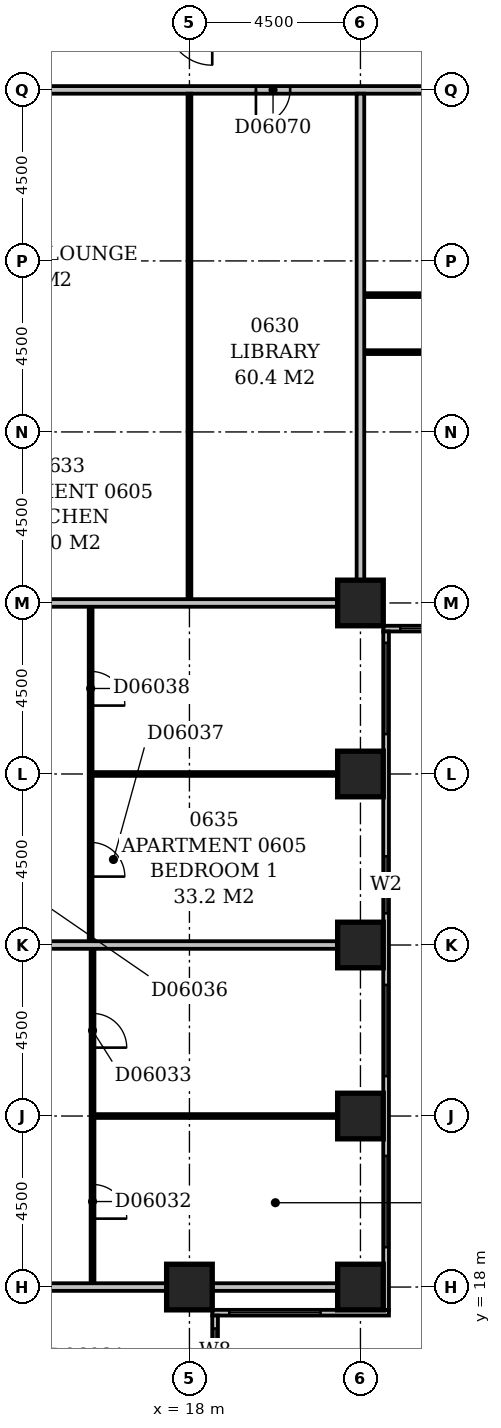
"""IFC4 building model, lengths in metres.
Left out: names, types, materials, properties, quantities, classifications, styles, units other than length and angle.
Written with IfcOpenShell. Run it as: python <this file> out.ifc"""

import sys

from ifc_helpers import new_model, si_unit, direction, frame, frame_2d, origin, origin_2d, place, context, subcontext, project, spatial, rectangle, extrude, element, fill, save


model = new_model("IFC4")
c1 = context("Model", 3, precision=1e-05, world=origin(), true_north=direction((0.0, 1.0)))
c2 = subcontext(c1, "Body", "Model", "MODEL_VIEW")
j1 = project(units=[si_unit("LENGTHUNIT", "METRE"), si_unit("PLANEANGLEUNIT", "RADIAN")], contexts=[c1])
p1 = place(None, origin())
s1 = spatial("IfcSite", under=j1, at=p1, CompositionType="ELEMENT")
p2 = place(p1, origin())
s2 = spatial("IfcBuilding", under=s1, at=p2, CompositionType="ELEMENT")
p3 = place(p2, frame((0.0, 0.0, 32.6)))
s3 = spatial("IfcBuildingStorey", under=s2, at=p3, CompositionType="ELEMENT", Elevation=32.6)
for number, where, z_axis, x_axis in (
    (1, (18.0, 18.0, -0.3), (0.0, 0.0, 1.0), (1.0, 0.0, 0.0)),
    (2, (22.5, 18.0, -0.3), (0.0, 0.0, 1.0), (1.0, 0.0, 0.0)),
    (3, (22.5, 22.5, -0.3), (0.0, 0.0, 1.0), (1.0, 0.0, 0.0)),
    (4, (22.5, 27.0, -0.3), (0.0, 0.0, 1.0), (1.0, 0.0, 0.0)),
    (5, (22.5, 31.5, -0.3), (0.0, 0.0, 1.0), (1.0, 0.0, 0.0)),
    (6, (22.5, 36.0, -0.3), (0.0, 0.0, 1.0), (1.0, 0.0, 0.0)),
):
    element("IfcColumn", number, at=place(p3, frame(where, z_axis=z_axis, x_axis=x_axis)), inside=s3, PredefinedType="COLUMN", context=c2, shape_type="SweptSolid", body=[
        extrude(rectangle(XDim=1.2, YDim=1.2, at=origin_2d()), origin(), (0.0, 0.0, 1.0), 3.6),
    ])
p4 = place(p3, frame((18.675, 8.4, 0.0), z_axis=(0.0, 0.0, 1.0), x_axis=(0.0, 1.0, 0.0)))
e7 = element("IfcWall", 7, at=p4, inside=s3, PredefinedType="STANDARD", context=c2, shape_type="SweptSolid", body=[
    extrude(rectangle(XDim=8.85, YDim=0.15, at=frame_2d((4.425, 0.0))), origin(), (0.0, 0.0, 1.0), 2.7),
])
p5 = place(p4, frame((1.65, 0.0, 0.6)))
e8 = element("IfcOpeningElement", 8, at=p5, cuts=e7, PredefinedType="OPENING", context=c2, shape_type="SweptSolid", body=[
    extrude(rectangle(XDim=2.4, YDim=1.8, at=frame_2d((1.2, 0.9))), frame((0.0, 0.087, 0.0), z_axis=(0.0, -1.0, 0.0), x_axis=(1.0, 0.0, 0.0)), (0.0, 0.0, 1.0), 0.174),
])
p6 = place(p4, frame((7.309, 0.0, 0.6)))
e9 = element("IfcOpeningElement", 9, at=p6, cuts=e7, PredefinedType="OPENING", context=c2, shape_type="SweptSolid", body=[
    extrude(rectangle(XDim=1.2, YDim=1.8, at=frame_2d((0.6, 0.9))), frame((0.0, 0.087, 0.0), z_axis=(0.0, -1.0, 0.0), x_axis=(1.0, 0.0, 0.0)), (0.0, 0.0, 1.0), 0.174),
])
p7 = place(p3, frame((18.6, 17.325, 0.0), z_axis=(0.0, 0.0, 1.0), x_axis=(1.0, 0.0, 0.0)))
e10 = element("IfcWall", 10, at=p7, inside=s3, PredefinedType="STANDARD", context=c2, shape_type="SweptSolid", body=[
    extrude(rectangle(XDim=4.65, YDim=0.15, at=frame_2d((2.325, 0.0))), origin(), (0.0, 0.0, 1.0), 2.7),
])
p8 = place(p7, frame((0.45, 0.0, 0.6)))
e11 = element("IfcOpeningElement", 11, at=p8, cuts=e10, PredefinedType="OPENING", context=c2, shape_type="SweptSolid", body=[
    extrude(rectangle(XDim=2.4, YDim=1.8, at=frame_2d((1.2, 0.9))), frame((0.0, 0.087, 0.0), z_axis=(0.0, -1.0, 0.0), x_axis=(1.0, 0.0, 0.0)), (0.0, 0.0, 1.0), 0.174),
])
p9 = place(p3, frame((23.175, 17.4, 0.0), z_axis=(0.0, 0.0, 1.0), x_axis=(0.0, 1.0, 0.0)))
e12 = element("IfcWall", 12, at=p9, inside=s3, PredefinedType="STANDARD", context=c2, shape_type="SweptSolid", body=[
    extrude(rectangle(XDim=17.85, YDim=0.15, at=frame_2d((8.925, 0.0))), origin(), (0.0, 0.0, 1.0), 2.7),
])
p10 = place(p9, frame((1.65, 0.0, 0.6)))
e13 = element("IfcOpeningElement", 13, at=p10, cuts=e12, PredefinedType="OPENING", context=c2, shape_type="SweptSolid", body=[
    extrude(rectangle(XDim=2.4, YDim=1.8, at=frame_2d((1.2, 0.9))), frame((0.0, 0.087, 0.0), z_axis=(0.0, -1.0, 0.0), x_axis=(1.0, 0.0, 0.0)), (0.0, 0.0, 1.0), 0.174),
])
p11 = place(p9, frame((6.15, 0.0, 0.6)))
e14 = element("IfcOpeningElement", 14, at=p11, cuts=e12, PredefinedType="OPENING", context=c2, shape_type="SweptSolid", body=[
    extrude(rectangle(XDim=2.4, YDim=1.8, at=frame_2d((1.2, 0.9))), frame((0.0, 0.087, 0.0), z_axis=(0.0, -1.0, 0.0), x_axis=(1.0, 0.0, 0.0)), (0.0, 0.0, 1.0), 0.174),
])
p12 = place(p9, frame((10.433, 0.0, 0.6)))
e15 = element("IfcOpeningElement", 15, at=p12, cuts=e12, PredefinedType="OPENING", context=c2, shape_type="SweptSolid", body=[
    extrude(rectangle(XDim=1.5, YDim=1.8, at=frame_2d((0.75, 0.9))), frame((0.0, 0.087, 0.0), z_axis=(0.0, -1.0, 0.0), x_axis=(1.0, 0.0, 0.0)), (0.0, 0.0, 1.0), 0.174),
])
p13 = place(p9, frame((15.15, 0.0, 0.6)))
e16 = element("IfcOpeningElement", 16, at=p13, cuts=e12, PredefinedType="OPENING", context=c2, shape_type="SweptSolid", body=[
    extrude(rectangle(XDim=2.4, YDim=1.8, at=frame_2d((1.2, 0.9))), frame((0.0, 0.087, 0.0), z_axis=(0.0, -1.0, 0.0), x_axis=(1.0, 0.0, 0.0)), (0.0, 0.0, 1.0), 0.174),
])
p14 = place(p3, frame((23.1, 35.325, 0.0), z_axis=(0.0, 0.0, 1.0), x_axis=(1.0, 0.0, 0.0)))
e17 = element("IfcWall", 17, at=p14, inside=s3, PredefinedType="STANDARD", context=c2, shape_type="SweptSolid", body=[
    extrude(rectangle(XDim=45.15, YDim=0.15, at=frame_2d((22.575, 0.0))), origin(), (0.0, 0.0, 1.0), 2.7),
])
p15 = place(p14, frame((0.45, 0.0, 0.6)))
e18 = element("IfcOpeningElement", 18, at=p15, cuts=e17, PredefinedType="OPENING", context=c2, shape_type="SweptSolid", body=[
    extrude(rectangle(XDim=2.4, YDim=1.8, at=frame_2d((1.2, 0.9))), frame((0.0, 0.087, 0.0), z_axis=(0.0, -1.0, 0.0), x_axis=(1.0, 0.0, 0.0)), (0.0, 0.0, 1.0), 0.174),
])
p16 = place(p14, frame((4.95, 0.0, 0.6)))
e19 = element("IfcOpeningElement", 19, at=p16, cuts=e17, PredefinedType="OPENING", context=c2, shape_type="SweptSolid", body=[
    extrude(rectangle(XDim=2.4, YDim=1.8, at=frame_2d((1.2, 0.9))), frame((0.0, 0.087, 0.0), z_axis=(0.0, -1.0, 0.0), x_axis=(1.0, 0.0, 0.0)), (0.0, 0.0, 1.0), 0.174),
])
p17 = place(p14, frame((10.583, 0.0, 0.6)))
e20 = element("IfcOpeningElement", 20, at=p17, cuts=e17, PredefinedType="OPENING", context=c2, shape_type="SweptSolid", body=[
    extrude(rectangle(XDim=1.5, YDim=1.8, at=frame_2d((0.75, 0.9))), frame((0.0, 0.087, 0.0), z_axis=(0.0, -1.0, 0.0), x_axis=(1.0, 0.0, 0.0)), (0.0, 0.0, 1.0), 0.174),
])
p18 = place(p14, frame((13.83, 0.0, 0.6)))
e21 = element("IfcOpeningElement", 21, at=p18, cuts=e17, PredefinedType="OPENING", context=c2, shape_type="SweptSolid", body=[
    extrude(rectangle(XDim=1.5, YDim=1.8, at=frame_2d((0.75, 0.9))), frame((0.0, 0.087, 0.0), z_axis=(0.0, -1.0, 0.0), x_axis=(1.0, 0.0, 0.0)), (0.0, 0.0, 1.0), 0.174),
])
p19 = place(p14, frame((18.45, 0.0, 0.6)))
e22 = element("IfcOpeningElement", 22, at=p19, cuts=e17, PredefinedType="OPENING", context=c2, shape_type="SweptSolid", body=[
    extrude(rectangle(XDim=2.4, YDim=1.8, at=frame_2d((1.2, 0.9))), frame((0.0, 0.087, 0.0), z_axis=(0.0, -1.0, 0.0), x_axis=(1.0, 0.0, 0.0)), (0.0, 0.0, 1.0), 0.174),
])
p20 = place(p14, frame((22.95, 0.0, 0.6)))
e23 = element("IfcOpeningElement", 23, at=p20, cuts=e17, PredefinedType="OPENING", context=c2, shape_type="SweptSolid", body=[
    extrude(rectangle(XDim=2.4, YDim=1.8, at=frame_2d((1.2, 0.9))), frame((0.0, 0.087, 0.0), z_axis=(0.0, -1.0, 0.0), x_axis=(1.0, 0.0, 0.0)), (0.0, 0.0, 1.0), 0.174),
])
p21 = place(p14, frame((27.45, 0.0, 0.6)))
e24 = element("IfcOpeningElement", 24, at=p21, cuts=e17, PredefinedType="OPENING", context=c2, shape_type="SweptSolid", body=[
    extrude(rectangle(XDim=2.4, YDim=1.8, at=frame_2d((1.2, 0.9))), frame((0.0, 0.087, 0.0), z_axis=(0.0, -1.0, 0.0), x_axis=(1.0, 0.0, 0.0)), (0.0, 0.0, 1.0), 0.174),
])
p22 = place(p14, frame((31.95, 0.0, 0.6)))
e25 = element("IfcOpeningElement", 25, at=p22, cuts=e17, PredefinedType="OPENING", context=c2, shape_type="SweptSolid", body=[
    extrude(rectangle(XDim=2.4, YDim=1.8, at=frame_2d((1.2, 0.9))), frame((0.0, 0.087, 0.0), z_axis=(0.0, -1.0, 0.0), x_axis=(1.0, 0.0, 0.0)), (0.0, 0.0, 1.0), 0.174),
])
p23 = place(p14, frame((36.297, 0.0, 0.6)))
e26 = element("IfcOpeningElement", 26, at=p23, cuts=e17, PredefinedType="OPENING", context=c2, shape_type="SweptSolid", body=[
    extrude(rectangle(XDim=2.1, YDim=1.8, at=frame_2d((1.05, 0.9))), frame((0.0, 0.087, 0.0), z_axis=(0.0, -1.0, 0.0), x_axis=(1.0, 0.0, 0.0)), (0.0, 0.0, 1.0), 0.174),
])
p24 = place(p14, frame((40.95, 0.0, 0.6)))
e27 = element("IfcOpeningElement", 27, at=p24, cuts=e17, PredefinedType="OPENING", context=c2, shape_type="SweptSolid", body=[
    extrude(rectangle(XDim=2.4, YDim=1.8, at=frame_2d((1.2, 0.9))), frame((0.0, 0.087, 0.0), z_axis=(0.0, -1.0, 0.0), x_axis=(1.0, 0.0, 0.0)), (0.0, 0.0, 1.0), 0.174),
])
p25 = place(p3, frame((9.1, 18.0, 0.0), z_axis=(0.0, 0.0, 1.0), x_axis=(1.0, 0.0, 0.0)))
e28 = element("IfcWall", 28, at=p25, inside=s3, PredefinedType="PARTITIONING", context=c2, shape_type="SweptSolid", body=[
    extrude(rectangle(XDim=8.3, YDim=0.2, at=frame_2d((4.15, 0.0))), origin(), (0.0, 0.0, 1.0), 2.6),
])
p26 = place(p3, frame((18.6, 18.0, 0.0), z_axis=(0.0, 0.0, 1.0), x_axis=(1.0, 0.0, 0.0)))
e29 = element("IfcWall", 29, at=p26, inside=s3, PredefinedType="PARTITIONING", context=c2, shape_type="SweptSolid", body=[
    extrude(rectangle(XDim=3.3, YDim=0.2, at=frame_2d((1.65, 0.0))), origin(), (0.0, 0.0, 1.0), 2.7),
])
p27 = place(p3, frame((15.45, 18.1, 0.0), z_axis=(0.0, 0.0, 1.0), x_axis=(0.0, 1.0, 0.0)))
e30 = element("IfcWall", 30, at=p27, inside=s3, PredefinedType="PARTITIONING", context=c2, shape_type="SweptSolid", body=[
    extrude(rectangle(XDim=8.8, YDim=0.1, at=frame_2d((4.4, 0.0))), origin(), (0.0, 0.0, 1.0), 3.3),
])
p28 = place(p27, frame((1.7, 0.0, 0.0)))
e31 = element("IfcOpeningElement", 31, at=p28, cuts=e30, PredefinedType="OPENING", context=c2, shape_type="SweptSolid", body=[
    extrude(rectangle(XDim=0.9, YDim=2.1, at=frame_2d((0.45, 1.05))), frame((0.0, 0.062, 0.0), z_axis=(0.0, -1.0, 0.0), x_axis=(1.0, 0.0, 0.0)), (0.0, 0.0, 1.0), 0.124),
])
p29 = place(p27, frame((6.2, 0.0, 0.0)))
e32 = element("IfcOpeningElement", 32, at=p29, cuts=e30, PredefinedType="OPENING", context=c2, shape_type="SweptSolid", body=[
    extrude(rectangle(XDim=0.9, YDim=2.1, at=frame_2d((0.45, 1.05))), frame((0.0, 0.062, 0.0), z_axis=(0.0, -1.0, 0.0), x_axis=(1.0, 0.0, 0.0)), (0.0, 0.0, 1.0), 0.124),
])
p30 = place(p3, frame((15.5, 22.5, 0.0), z_axis=(0.0, 0.0, 1.0), x_axis=(1.0, 0.0, 0.0)))
e33 = element("IfcWall", 33, at=p30, inside=s3, PredefinedType="PARTITIONING", context=c2, shape_type="SweptSolid", body=[
    extrude(rectangle(XDim=6.4, YDim=0.1, at=frame_2d((3.2, 0.0))), origin(), (0.0, 0.0, 1.0), 3.3),
])
p31 = place(p3, frame((9.1, 27.0, 0.0), z_axis=(0.0, 0.0, 1.0), x_axis=(1.0, 0.0, 0.0)))
e34 = element("IfcWall", 34, at=p31, inside=s3, PredefinedType="PARTITIONING", context=c2, shape_type="SweptSolid", body=[
    extrude(rectangle(XDim=12.8, YDim=0.2, at=frame_2d((6.4, 0.0))), origin(), (0.0, 0.0, 1.0), 2.7),
])
p32 = place(p3, frame((15.4, 27.1, 0.0), z_axis=(0.0, 0.0, 1.0), x_axis=(0.0, 1.0, 0.0)))
e35 = element("IfcWall", 35, at=p32, inside=s3, PredefinedType="PARTITIONING", context=c2, shape_type="SweptSolid", body=[
    extrude(rectangle(XDim=8.8, YDim=0.1, at=frame_2d((4.4, 0.0))), origin(), (0.0, 0.0, 1.0), 3.3),
])
p33 = place(p32, frame((1.7, 0.0, 0.0)))
e36 = element("IfcOpeningElement", 36, at=p33, cuts=e35, PredefinedType="OPENING", context=c2, shape_type="SweptSolid", body=[
    extrude(rectangle(XDim=0.9, YDim=2.1, at=frame_2d((0.45, 1.05))), frame((0.0, 0.062, 0.0), z_axis=(0.0, -1.0, 0.0), x_axis=(1.0, 0.0, 0.0)), (0.0, 0.0, 1.0), 0.124),
])
p34 = place(p32, frame((6.2, 0.0, 0.0)))
e37 = element("IfcOpeningElement", 37, at=p34, cuts=e35, PredefinedType="OPENING", context=c2, shape_type="SweptSolid", body=[
    extrude(rectangle(XDim=0.9, YDim=2.1, at=frame_2d((0.45, 1.05))), frame((0.0, 0.062, 0.0), z_axis=(0.0, -1.0, 0.0), x_axis=(1.0, 0.0, 0.0)), (0.0, 0.0, 1.0), 0.124),
])
p35 = place(p3, frame((15.45, 31.5, 0.0), z_axis=(0.0, 0.0, 1.0), x_axis=(1.0, 0.0, 0.0)))
e38 = element("IfcWall", 38, at=p35, inside=s3, PredefinedType="PARTITIONING", context=c2, shape_type="SweptSolid", body=[
    extrude(rectangle(XDim=6.45, YDim=0.1, at=frame_2d((3.225, 0.0))), origin(), (0.0, 0.0, 1.0), 3.3),
])
p36 = place(p3, frame((9.1, 36.0, 0.0), z_axis=(0.0, 0.0, 1.0), x_axis=(1.0, 0.0, 0.0)))
e39 = element("IfcWall", 39, at=p36, inside=s3, PredefinedType="PARTITIONING", context=c2, shape_type="SweptSolid", body=[
    extrude(rectangle(XDim=12.8, YDim=0.2, at=frame_2d((6.4, 0.0))), origin(), (0.0, 0.0, 1.0), 2.4),
])
p37 = place(p3, frame((18.0, 36.1, 0.0), z_axis=(0.0, 0.0, 1.0), x_axis=(0.0, 1.0, 0.0)))
e40 = element("IfcWall", 40, at=p37, inside=s3, PredefinedType="PARTITIONING", context=c2, shape_type="SweptSolid", body=[
    extrude(rectangle(XDim=13.3, YDim=0.1, at=frame_2d((6.65, 0.0))), origin(), (0.0, 0.0, 1.0), 3.3),
])
p38 = place(p3, frame((22.5, 36.6, 0.0), z_axis=(0.0, 0.0, 1.0), x_axis=(0.0, 1.0, 0.0)))
e41 = element("IfcWall", 41, at=p38, inside=s3, PredefinedType="PARTITIONING", context=c2, shape_type="SweptSolid", body=[
    extrude(rectangle(XDim=12.8, YDim=0.2, at=frame_2d((6.4, 0.0))), origin(), (0.0, 0.0, 1.0), 3.3),
])
p39 = place(p3, frame((22.6, 42.6, 0.0), z_axis=(0.0, 0.0, 1.0), x_axis=(1.0, 0.0, 0.0)))
e42 = element("IfcWall", 42, at=p39, inside=s3, PredefinedType="PARTITIONING", context=c2, shape_type="SweptSolid", body=[
    extrude(rectangle(XDim=17.8, YDim=0.1, at=frame_2d((8.9, 0.0))), origin(), (0.0, 0.0, 1.0), 3.3),
])
p40 = place(p39, frame((3.9, 0.0, 0.0)))
e43 = element("IfcOpeningElement", 43, at=p40, cuts=e42, PredefinedType="OPENING", context=c2, shape_type="SweptSolid", body=[
    extrude(rectangle(XDim=0.9, YDim=2.1, at=frame_2d((0.45, 1.05))), frame((0.0, 0.062, 0.0), z_axis=(0.0, -1.0, 0.0), x_axis=(1.0, 0.0, 0.0)), (0.0, 0.0, 1.0), 0.124),
])
p41 = place(p39, frame((10.7, 0.0, 0.0)))
e44 = element("IfcOpeningElement", 44, at=p41, cuts=e42, PredefinedType="OPENING", context=c2, shape_type="SweptSolid", body=[
    extrude(rectangle(XDim=0.9, YDim=2.1, at=frame_2d((0.45, 1.05))), frame((0.0, 0.062, 0.0), z_axis=(0.0, -1.0, 0.0), x_axis=(1.0, 0.0, 0.0)), (0.0, 0.0, 1.0), 0.124),
])
p42 = place(p39, frame((14.05, 0.0, 0.0)))
e45 = element("IfcOpeningElement", 45, at=p42, cuts=e42, PredefinedType="OPENING", context=c2, shape_type="SweptSolid", body=[
    extrude(rectangle(XDim=0.9, YDim=2.1, at=frame_2d((0.45, 1.05))), frame((0.0, 0.062, 0.0), z_axis=(0.0, -1.0, 0.0), x_axis=(1.0, 0.0, 0.0)), (0.0, 0.0, 1.0), 0.124),
])
p43 = place(p3, frame((22.6, 44.1, 0.0), z_axis=(0.0, 0.0, 1.0), x_axis=(1.0, 0.0, 0.0)))
e46 = element("IfcWall", 46, at=p43, inside=s3, PredefinedType="PARTITIONING", context=c2, shape_type="SweptSolid", body=[
    extrude(rectangle(XDim=6.75, YDim=0.1, at=frame_2d((3.375, 0.0))), origin(), (0.0, 0.0, 1.0), 3.3),
])
p44 = place(p43, frame((2.9, 0.0, 0.0)))
e47 = element("IfcOpeningElement", 47, at=p44, cuts=e46, PredefinedType="OPENING", context=c2, shape_type="SweptSolid", body=[
    extrude(rectangle(XDim=0.9, YDim=2.1, at=frame_2d((0.45, 1.05))), frame((0.0, 0.062, 0.0), z_axis=(0.0, -1.0, 0.0), x_axis=(1.0, 0.0, 0.0)), (0.0, 0.0, 1.0), 0.124),
])
p45 = place(p3, frame((9.1, 49.5, 0.0), z_axis=(0.0, 0.0, 1.0), x_axis=(1.0, 0.0, 0.0)))
e48 = element("IfcWall", 48, at=p45, inside=s3, PredefinedType="PARTITIONING", context=c2, shape_type="SweptSolid", body=[
    extrude(rectangle(XDim=57.8, YDim=0.2, at=frame_2d((28.9, 0.0))), origin(), (0.0, 0.0, 1.0), 3.3),
])
p46 = place(p45, frame((20.6, 0.0, 0.0)))
e49 = element("IfcOpeningElement", 49, at=p46, cuts=e48, PredefinedType="OPENING", context=c2, shape_type="SweptSolid", body=[
    extrude(rectangle(XDim=1.0, YDim=2.1, at=frame_2d((0.5, 1.05))), frame((0.0, 0.112, 0.0), z_axis=(0.0, -1.0, 0.0), x_axis=(1.0, 0.0, 0.0)), (0.0, 0.0, 1.0), 0.224),
])
p47 = place(p45, frame((31.7, 0.0, 0.0)))
e50 = element("IfcOpeningElement", 50, at=p47, cuts=e48, PredefinedType="OPENING", context=c2, shape_type="SweptSolid", body=[
    extrude(rectangle(XDim=1.0, YDim=2.1, at=frame_2d((0.5, 1.05))), frame((0.0, 0.112, 0.0), z_axis=(0.0, -1.0, 0.0), x_axis=(1.0, 0.0, 0.0)), (0.0, 0.0, 1.0), 0.224),
])
p48 = place(p45, frame((47.6, 0.0, 0.0)))
e51 = element("IfcOpeningElement", 51, at=p48, cuts=e48, PredefinedType="OPENING", context=c2, shape_type="SweptSolid", body=[
    extrude(rectangle(XDim=1.0, YDim=2.1, at=frame_2d((0.5, 1.05))), frame((0.0, 0.112, 0.0), z_axis=(0.0, -1.0, 0.0), x_axis=(1.0, 0.0, 0.0)), (0.0, 0.0, 1.0), 0.224),
])
p49 = place(p45, frame((54.15, 0.0, 0.0)))
e52 = element("IfcOpeningElement", 52, at=p49, cuts=e48, PredefinedType="OPENING", context=c2, shape_type="SweptSolid", body=[
    extrude(rectangle(XDim=1.0, YDim=2.1, at=frame_2d((0.5, 1.05))), frame((0.0, 0.112, 0.0), z_axis=(0.0, -1.0, 0.0), x_axis=(1.0, 0.0, 0.0)), (0.0, 0.0, 1.0), 0.224),
])
p50 = place(p45, frame((10.65, 0.0, 0.0)))
e53 = element("IfcOpeningElement", 53, at=p50, cuts=e48, PredefinedType="OPENING", context=c2, shape_type="SweptSolid", body=[
    extrude(rectangle(XDim=0.9, YDim=2.1, at=frame_2d((0.45, 1.05))), frame((0.0, 0.112, 0.0), z_axis=(0.0, -1.0, 0.0), x_axis=(1.0, 0.0, 0.0)), (0.0, 0.0, 1.0), 0.224),
])
p51 = place(p6, origin())
e54 = element("IfcWindow", 54, at=p51, inside=s3, PartitioningType="SINGLE_PANEL", PredefinedType="WINDOW", context=c2, shape_type="SweptSolid", body=[
    extrude(rectangle(XDim=1.2, YDim=1.8, at=frame_2d((0.6, 0.9))), frame((0.0, 0.03, 0.0), z_axis=(0.0, -1.0, 0.0), x_axis=(1.0, 0.0, 0.0)), (0.0, 0.0, 1.0), 0.06),
])
fill(e9, e54)
p52 = place(p8, origin())
e55 = element("IfcWindow", 55, at=p52, inside=s3, PartitioningType="SINGLE_PANEL", PredefinedType="WINDOW", context=c2, shape_type="SweptSolid", body=[
    extrude(rectangle(XDim=2.4, YDim=1.8, at=frame_2d((1.2, 0.9))), frame((0.0, 0.03, 0.0), z_axis=(0.0, -1.0, 0.0), x_axis=(1.0, 0.0, 0.0)), (0.0, 0.0, 1.0), 0.06),
])
fill(e11, e55)
p53 = place(p10, origin())
e56 = element("IfcWindow", 56, at=p53, inside=s3, PartitioningType="SINGLE_PANEL", PredefinedType="WINDOW", context=c2, shape_type="SweptSolid", body=[
    extrude(rectangle(XDim=2.4, YDim=1.8, at=frame_2d((1.2, 0.9))), frame((0.0, 0.03, 0.0), z_axis=(0.0, -1.0, 0.0), x_axis=(1.0, 0.0, 0.0)), (0.0, 0.0, 1.0), 0.06),
])
fill(e13, e56)
p54 = place(p11, origin())
e57 = element("IfcWindow", 57, at=p54, inside=s3, PartitioningType="SINGLE_PANEL", PredefinedType="WINDOW", context=c2, shape_type="SweptSolid", body=[
    extrude(rectangle(XDim=2.4, YDim=1.8, at=frame_2d((1.2, 0.9))), frame((0.0, 0.03, 0.0), z_axis=(0.0, -1.0, 0.0), x_axis=(1.0, 0.0, 0.0)), (0.0, 0.0, 1.0), 0.06),
])
fill(e14, e57)
p55 = place(p12, origin())
e58 = element("IfcWindow", 58, at=p55, inside=s3, PartitioningType="SINGLE_PANEL", PredefinedType="WINDOW", context=c2, shape_type="SweptSolid", body=[
    extrude(rectangle(XDim=1.5, YDim=1.8, at=frame_2d((0.75, 0.9))), frame((0.0, 0.03, 0.0), z_axis=(0.0, -1.0, 0.0), x_axis=(1.0, 0.0, 0.0)), (0.0, 0.0, 1.0), 0.06),
])
fill(e15, e58)
p56 = place(p13, origin())
e59 = element("IfcWindow", 59, at=p56, inside=s3, PartitioningType="SINGLE_PANEL", PredefinedType="WINDOW", context=c2, shape_type="SweptSolid", body=[
    extrude(rectangle(XDim=2.4, YDim=1.8, at=frame_2d((1.2, 0.9))), frame((0.0, 0.03, 0.0), z_axis=(0.0, -1.0, 0.0), x_axis=(1.0, 0.0, 0.0)), (0.0, 0.0, 1.0), 0.06),
])
fill(e16, e59)
p57 = place(p15, origin())
e60 = element("IfcWindow", 60, at=p57, inside=s3, PartitioningType="SINGLE_PANEL", PredefinedType="WINDOW", context=c2, shape_type="SweptSolid", body=[
    extrude(rectangle(XDim=2.4, YDim=1.8, at=frame_2d((1.2, 0.9))), frame((0.0, 0.03, 0.0), z_axis=(0.0, -1.0, 0.0), x_axis=(1.0, 0.0, 0.0)), (0.0, 0.0, 1.0), 0.06),
])
fill(e18, e60)
p58 = place(p28, frame((0.9, 0.0, 0.0), z_axis=(0.0, 0.0, 1.0), x_axis=(-1.0, 0.0, 0.0)))
e61 = element("IfcDoor", 61, at=p58, inside=s3, OperationType="SINGLE_SWING_RIGHT", PredefinedType="DOOR", context=c2, shape_type="SweptSolid", body=[
    extrude(rectangle(XDim=0.9, YDim=2.1, at=frame_2d((0.45, 1.05))), frame((0.0, 0.025, 0.0), z_axis=(0.0, -1.0, 0.0), x_axis=(1.0, 0.0, 0.0)), (0.0, 0.0, 1.0), 0.05),
])
fill(e31, e61)
p59 = place(p29, frame((0.9, 0.0, 0.0), z_axis=(0.0, 0.0, 1.0), x_axis=(-1.0, 0.0, 0.0)))
e62 = element("IfcDoor", 62, at=p59, inside=s3, OperationType="SINGLE_SWING_RIGHT", PredefinedType="DOOR", context=c2, shape_type="SweptSolid", body=[
    extrude(rectangle(XDim=0.9, YDim=2.1, at=frame_2d((0.45, 1.05))), frame((0.0, 0.025, 0.0), z_axis=(0.0, -1.0, 0.0), x_axis=(1.0, 0.0, 0.0)), (0.0, 0.0, 1.0), 0.05),
])
fill(e32, e62)
p60 = place(p33, frame((0.9, 0.0, 0.0), z_axis=(0.0, 0.0, 1.0), x_axis=(-1.0, 0.0, 0.0)))
e63 = element("IfcDoor", 63, at=p60, inside=s3, OperationType="SINGLE_SWING_RIGHT", PredefinedType="DOOR", context=c2, shape_type="SweptSolid", body=[
    extrude(rectangle(XDim=0.9, YDim=2.1, at=frame_2d((0.45, 1.05))), frame((0.0, 0.025, 0.0), z_axis=(0.0, -1.0, 0.0), x_axis=(1.0, 0.0, 0.0)), (0.0, 0.0, 1.0), 0.05),
])
fill(e36, e63)
p61 = place(p34, frame((0.9, 0.0, 0.0), z_axis=(0.0, 0.0, 1.0), x_axis=(-1.0, 0.0, 0.0)))
e64 = element("IfcDoor", 64, at=p61, inside=s3, OperationType="SINGLE_SWING_RIGHT", PredefinedType="DOOR", context=c2, shape_type="SweptSolid", body=[
    extrude(rectangle(XDim=0.9, YDim=2.1, at=frame_2d((0.45, 1.05))), frame((0.0, 0.025, 0.0), z_axis=(0.0, -1.0, 0.0), x_axis=(1.0, 0.0, 0.0)), (0.0, 0.0, 1.0), 0.05),
])
fill(e37, e64)
p62 = place(p50, frame((0.9, 0.0, 0.0), z_axis=(0.0, 0.0, 1.0), x_axis=(-1.0, 0.0, 0.0)))
e65 = element("IfcDoor", 65, at=p62, inside=s3, OperationType="SINGLE_SWING_RIGHT", PredefinedType="DOOR", context=c2, shape_type="SweptSolid", body=[
    extrude(rectangle(XDim=0.9, YDim=2.1, at=frame_2d((0.45, 1.05))), frame((0.0, 0.025, 0.0), z_axis=(0.0, -1.0, 0.0), x_axis=(1.0, 0.0, 0.0)), (0.0, 0.0, 1.0), 0.05),
])
fill(e53, e65)
save(model, sys.argv[1])
